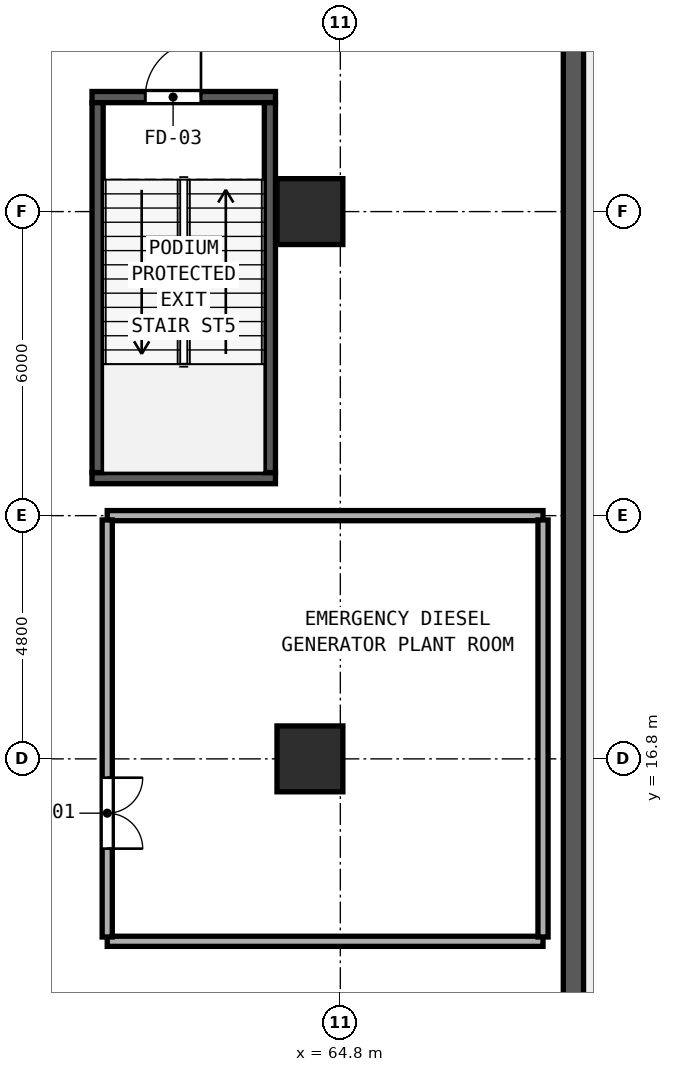
"""IFC4 building model, lengths in metres.
Left out: names, types, materials, properties, quantities, classifications, styles, units other than length and angle.
Written with IfcOpenShell. Run it as: python <this file> out.ifc"""

import sys

from ifc_helpers import new_model, si_unit, direction, frame, frame_2d, origin, origin_2d, place, context, subcontext, project, spatial, rectangle, hollow_rectangle, extrude, element, fill, save


model = new_model("IFC4")
c1 = context("Model", 3, precision=1e-05, world=origin(), true_north=direction((0.0, 1.0)))
c2 = subcontext(c1, "Body", "Model", "MODEL_VIEW")
j1 = project(units=[si_unit("LENGTHUNIT", "METRE"), si_unit("PLANEANGLEUNIT", "RADIAN")], contexts=[c1])
p1 = place(None, origin())
s1 = spatial("IfcSite", under=j1, at=p1, CompositionType="ELEMENT")
p2 = place(p1, origin())
s2 = spatial("IfcBuilding", under=s1, at=p2, CompositionType="ELEMENT")
p3 = place(p2, frame((0.0, 0.0, -4.8)))
s3 = spatial("IfcBuildingStorey", under=s2, at=p3, CompositionType="ELEMENT", Elevation=-4.8)
p4 = place(p3, frame((69.4, 10.5, 0.0), z_axis=(0.0, 0.0, 1.0), x_axis=(0.0, 1.0, 0.0)))
e1 = element("IfcWall", 1, at=p4, inside=s3, PredefinedType="SOLIDWALL", context=c2, shape_type="SweptSolid", body=[
    extrude(rectangle(XDim=36.5, YDim=0.4, at=frame_2d((18.25, 0.0))), origin(), (0.0, 0.0, 1.0), 4.5),
])
p5 = place(p3, frame((59.9, 29.86, 0.0), z_axis=(0.0, 0.0, 1.0), x_axis=(1.0, 0.0, 0.0)))
e2 = element("IfcWall", 2, at=p5, inside=s3, PredefinedType="SHEAR", context=c2, shape_type="SweptSolid", body=[
    extrude(rectangle(XDim=3.62, YDim=0.22, at=frame_2d((1.81, 0.0))), origin(), (0.0, 0.0, 1.0), 4.5),
])
p6 = place(p5, frame((1.05, 0.0, 0.0)))
e3 = element("IfcOpeningElement", 3, at=p6, cuts=e2, PredefinedType="OPENING", context=c2, shape_type="SweptSolid", body=[
    extrude(rectangle(XDim=1.1, YDim=2.15, at=frame_2d((0.55, 1.075))), frame((0.0, 0.12, 0.0), z_axis=(0.0, -1.0, 0.0), x_axis=(1.0, 0.0, 0.0)), (0.0, 0.0, 1.0), 0.24),
])
p7 = place(p3, frame((59.9, 22.34, 0.0), z_axis=(0.0, 0.0, 1.0), x_axis=(1.0, 0.0, 0.0)))
e4 = element("IfcWall", 4, at=p7, inside=s3, PredefinedType="SHEAR", context=c2, shape_type="SweptSolid", body=[
    extrude(rectangle(XDim=3.62, YDim=0.22, at=frame_2d((1.81, 0.0))), origin(), (0.0, 0.0, 1.0), 4.5),
])
for number, where, z_axis, x_axis in (
    (5, (60.01, 22.45, 0.0), (0.0, 0.0, 1.0), (0.0, 1.0, 0.0)),
    (6, (63.41, 22.45, 0.0), (0.0, 0.0, 1.0), (0.0, 1.0, 0.0)),
):
    element("IfcWall", number, at=place(p3, frame(where, z_axis=z_axis, x_axis=x_axis)), inside=s3, PredefinedType="SHEAR", context=c2, shape_type="SweptSolid", body=[
        extrude(rectangle(XDim=7.3, YDim=0.22, at=frame_2d((3.65, 0.0))), origin(), (0.0, 0.0, 1.0), 4.5),
    ])
for number, where, z_axis, x_axis in (
    (7, (64.2, 16.8, 0.0), (0.0, 0.0, 1.0), (1.0, 0.0, 0.0)),
    (8, (64.2, 27.6, 0.0), (0.0, 0.0, 1.0), (1.0, 0.0, 0.0)),
):
    element("IfcColumn", number, at=place(p3, frame(where, z_axis=z_axis, x_axis=x_axis)), inside=s3, PredefinedType="COLUMN", context=c2, shape_type="SweptSolid", body=[
        extrude(hollow_rectangle(XDim=1.3, YDim=1.3, WallThickness=0.048, at=origin_2d()), origin(), (0.0, 0.0, 1.0), 4.8),
    ])
for number, where, z_axis, x_axis in (
    (9, (60.2, 21.6, 0.0), (0.0, 0.0, 1.0), (1.0, 0.0, 0.0)),
    (10, (60.2, 13.2, 0.0), (0.0, 0.0, 1.0), (1.0, 0.0, 0.0)),
):
    element("IfcWall", number, at=place(p3, frame(where, z_axis=z_axis, x_axis=x_axis)), inside=s3, PredefinedType="SOLIDWALL", context=c2, shape_type="SweptSolid", body=[
        extrude(rectangle(XDim=8.6, YDim=0.2, at=frame_2d((4.3, 0.0))), origin(), (0.0, 0.0, 1.0), 4.5),
    ])
p8 = place(p3, frame((60.2, 13.285, 0.0), z_axis=(0.0, 0.0, 1.0), x_axis=(0.0, 1.0, 0.0)))
e11 = element("IfcWall", 11, at=p8, inside=s3, PredefinedType="SOLIDWALL", context=c2, shape_type="SweptSolid", body=[
    extrude(rectangle(XDim=8.23, YDim=0.2, at=frame_2d((4.115, 0.0))), origin(), (0.0, 0.0, 1.0), 4.5),
])
p9 = place(p8, frame((3.143, 0.0, 0.0), z_axis=(0.0, 0.0, 1.0), x_axis=(-1.0, 0.0, 0.0)))
e12 = element("IfcOpeningElement", 12, at=p9, cuts=e11, PredefinedType="OPENING", context=c2, shape_type="SweptSolid", body=[
    extrude(rectangle(XDim=1.4, YDim=2.2, at=frame_2d((0.7, 1.1))), frame((0.0, 0.11, 0.0), z_axis=(0.0, -1.0, 0.0), x_axis=(1.0, 0.0, 0.0)), (0.0, 0.0, 1.0), 0.22),
])
p10 = place(p3, frame((68.8, 13.285, 0.0), z_axis=(0.0, 0.0, 1.0), x_axis=(0.0, 1.0, 0.0)))
e13 = element("IfcWall", 13, at=p10, inside=s3, PredefinedType="SOLIDWALL", context=c2, shape_type="SweptSolid", body=[
    extrude(rectangle(XDim=8.23, YDim=0.2, at=frame_2d((4.115, 0.0))), origin(), (0.0, 0.0, 1.0), 4.5),
])
p11 = place(p6, origin())
e14 = element("IfcDoor", 14, at=p11, inside=s3, OperationType="SINGLE_SWING_RIGHT", PredefinedType="DOOR", context=c2, shape_type="SweptSolid", body=[
    extrude(rectangle(XDim=1.1, YDim=2.15, at=frame_2d((0.55, 1.075))), frame((0.0, 0.025, 0.0), z_axis=(0.0, -1.0, 0.0), x_axis=(1.0, 0.0, 0.0)), (0.0, 0.0, 1.0), 0.05),
])
fill(e3, e14)
p12 = place(p9, origin())
e15 = element("IfcDoor", 15, at=p12, inside=s3, OperationType="DOUBLE_DOOR_SINGLE_SWING", PredefinedType="DOOR", context=c2, shape_type="SweptSolid", body=[
    extrude(rectangle(XDim=1.4, YDim=2.2, at=frame_2d((0.7, 1.1))), frame((0.0, 0.025, 0.0), z_axis=(0.0, -1.0, 0.0), x_axis=(1.0, 0.0, 0.0)), (0.0, 0.0, 1.0), 0.05),
])
fill(e12, e15)
save(model, sys.argv[1])
